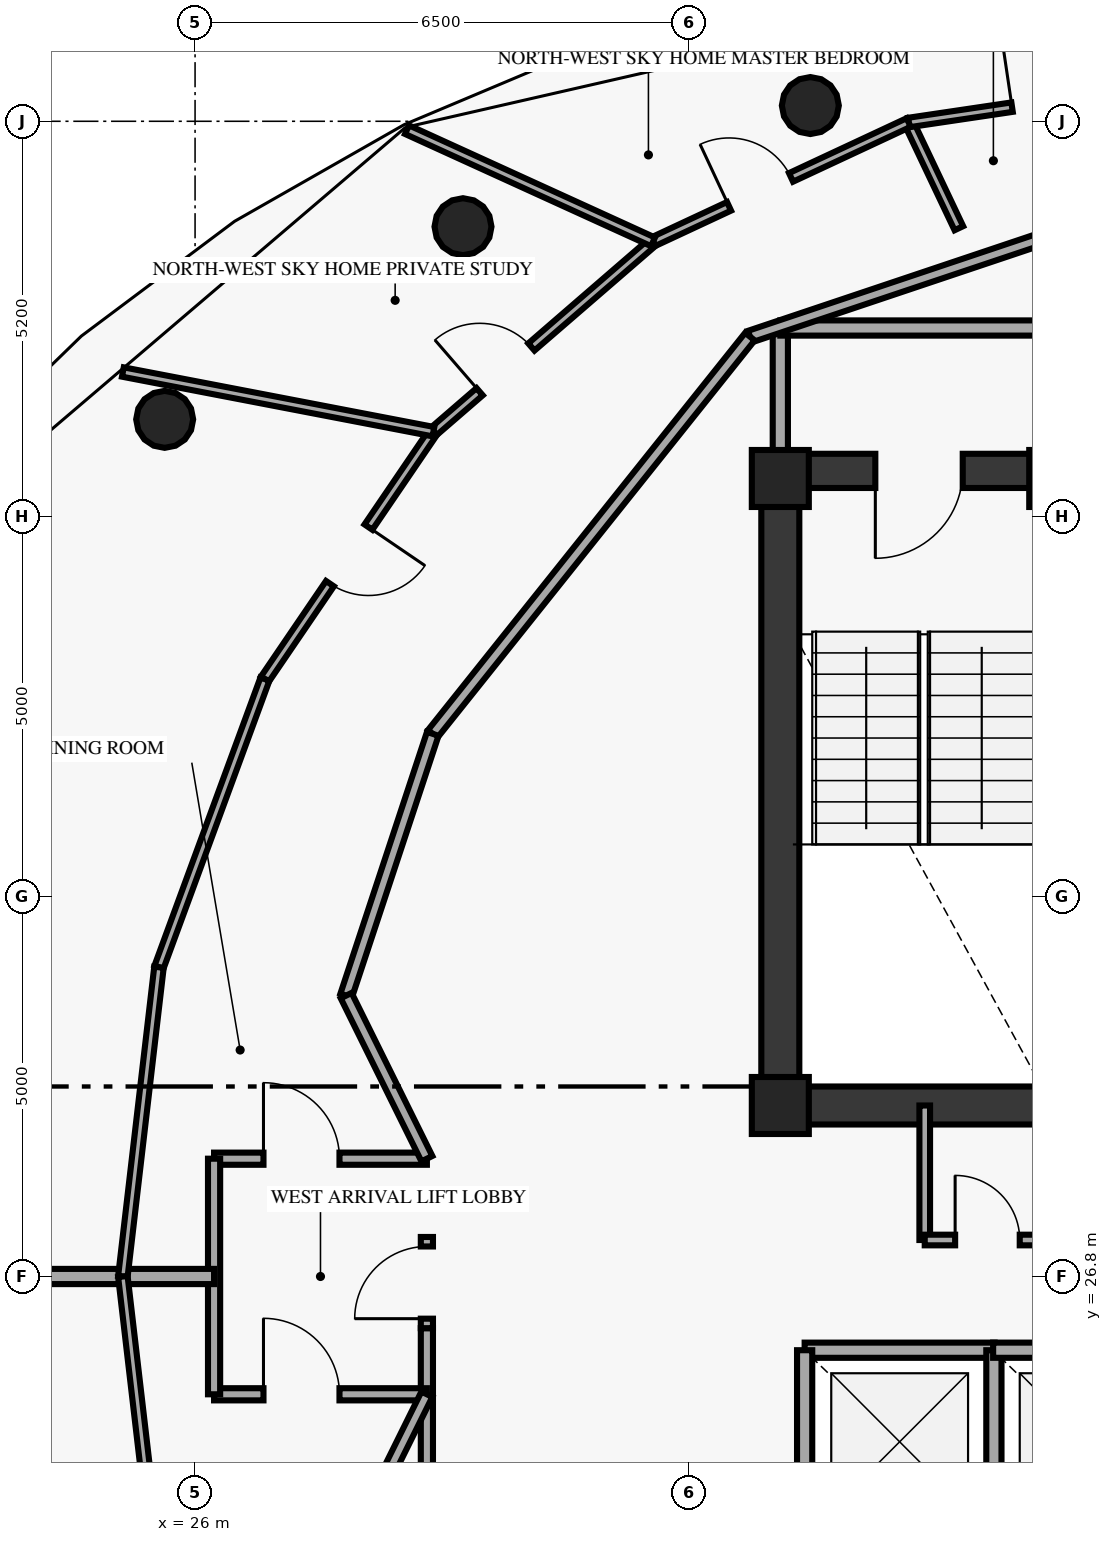
"""IFC4 building model, lengths in metres.
Left out: names, types, materials, properties, quantities, classifications, styles, units other than length and angle.
Written with IfcOpenShell. Run it as: python <this file> out.ifc"""

import sys

from ifc_helpers import new_model, si_unit, direction, frame, frame_2d, origin, origin_2d, place, context, subcontext, project, spatial, rectangle, circle, extrude, element, fill, save


model = new_model("IFC4")
c1 = context("Model", 3, precision=1e-05, world=origin(), true_north=direction((0.0, 1.0)))
c2 = subcontext(c1, "Body", "Model", "MODEL_VIEW")
j1 = project(units=[si_unit("LENGTHUNIT", "METRE"), si_unit("PLANEANGLEUNIT", "RADIAN")], contexts=[c1])
p1 = place(None, origin())
s1 = spatial("IfcSite", under=j1, at=p1, CompositionType="ELEMENT")
p2 = place(p1, origin())
s2 = spatial("IfcBuilding", under=s1, at=p2, CompositionType="ELEMENT")
p3 = place(p2, frame((0.0, 0.0, 297.4)))
s3 = spatial("IfcBuildingStorey", under=s2, at=p3, CompositionType="ELEMENT", Elevation=297.4)
for number, where, z_axis, x_axis in (
    (1, (37.35, 37.3, 0.0), (0.0, 0.0, 1.0), (1.0, 0.0, 0.0)),
    (2, (33.7, 37.3, 0.0), (0.0, 0.0, 1.0), (1.0, 0.0, 0.0)),
    (3, (33.7, 29.05, 0.0), (0.0, 0.0, 1.0), (1.0, 0.0, 0.0)),
):
    element("IfcColumn", number, at=place(p3, frame(where, z_axis=z_axis, x_axis=x_axis)), inside=s3, PredefinedType="PILASTER", context=c2, shape_type="SweptSolid", body=[
        extrude(rectangle(XDim=0.75, YDim=0.75, at=origin_2d()), origin(), (0.0, 0.0, 1.0), 3.45),
    ])
for number, where, z_axis, x_axis in (
    (4, (34.095, 42.207, 0.0), (0.0, 0.0, 1.0), (1.0, 0.0, 0.0)),
    (5, (29.525, 40.613, 0.0), (0.0, 0.0, 1.0), (1.0, 0.0, 0.0)),
    (6, (25.6, 38.078, 0.0), (0.0, 0.0, 1.0), (1.0, 0.0, 0.0)),
):
    element("IfcColumn", number, at=place(p3, frame(where, z_axis=z_axis, x_axis=x_axis)), inside=s3, PredefinedType="COLUMN", context=c2, shape_type="SweptSolid", body=[
        extrude(circle(Radius=0.375, at=origin_2d()), origin(), (0.0, 0.0, 1.0), 3.45),
    ])
p4 = place(p3, frame((33.7, 29.05, 0.0), z_axis=(0.0, 0.0, 1.0), x_axis=(0.0, 1.0, 0.0)))
e7 = element("IfcWall", 7, at=p4, inside=s3, PredefinedType="SHEAR", context=c2, shape_type="SweptSolid", body=[
    extrude(rectangle(XDim=8.35, YDim=0.5, at=frame_2d((4.175, 0.0))), origin(), (0.0, 0.0, 1.0), 3.45),
])
p5 = place(p3, frame((33.7, 29.05, 0.0), z_axis=(0.0, 0.0, 1.0), x_axis=(1.0, 0.0, 0.0)))
e8 = element("IfcWall", 8, at=p5, inside=s3, PredefinedType="SHEAR", context=c2, shape_type="SweptSolid", body=[
    extrude(rectangle(XDim=10.6, YDim=0.5, at=frame_2d((5.3, 0.0))), origin(), (0.0, 0.0, 1.0), 3.45),
])
p6 = place(p3, frame((37.35, 37.4, 0.0), z_axis=(0.0, 0.0, 1.0), x_axis=(-1.0, 0.0, 0.0)))
e9 = element("IfcWall", 9, at=p6, inside=s3, PredefinedType="SHEAR", context=c2, shape_type="SweptSolid", body=[
    extrude(rectangle(XDim=3.65, YDim=0.45, at=frame_2d((1.825, 0.0))), origin(), (0.0, 0.0, 1.0), 3.45),
])
p7 = place(p6, frame((1.25, 0.0, 0.0)))
e10 = element("IfcOpeningElement", 10, at=p7, cuts=e9, PredefinedType="OPENING", context=c2, shape_type="SweptSolid", body=[
    extrude(rectangle(XDim=1.15, YDim=2.15, at=frame_2d((0.575, 1.075))), frame((0.0, 0.235, 0.0), z_axis=(0.0, -1.0, 0.0), x_axis=(1.0, 0.0, 0.0)), (0.0, 0.0, 1.0), 0.47),
])
p8 = place(p3, frame((33.7, 37.4, 0.0), z_axis=(0.0, 0.0, 1.0), x_axis=(0.0, 1.0, 0.0)))
e11 = element("IfcWall", 11, at=p8, inside=s3, PredefinedType="SOLIDWALL", context=c2, shape_type="SweptSolid", body=[
    extrude(rectangle(XDim=1.88, YDim=0.2, at=frame_2d((0.94, 0.0))), origin(), (0.0, 0.0, 1.0), 3.45),
])
p9 = place(p3, frame((38.9, 39.28, 0.0), z_axis=(0.0, 0.0, 1.0), x_axis=(-1.0, 0.0, 0.0)))
e12 = element("IfcWall", 12, at=p9, inside=s3, PredefinedType="SOLIDWALL", context=c2, shape_type="SweptSolid", body=[
    extrude(rectangle(XDim=5.2, YDim=0.2, at=frame_2d((2.6, 0.0))), origin(), (0.0, 0.0, 1.0), 3.45),
])
p10 = place(p9, frame((0.2, 0.0, 0.0)))
e13 = element("IfcOpeningElement", 13, at=p10, cuts=e12, PredefinedType="OPENING", context=c2, shape_type="SweptSolid", body=[
    extrude(rectangle(XDim=1.6, YDim=2.2, at=frame_2d((0.8, 1.1))), frame((0.0, 0.11, 0.0), z_axis=(0.0, -1.0, 0.0), x_axis=(1.0, 0.0, 0.0)), (0.0, 0.0, 1.0), 0.22),
])
p11 = place(p3, frame((35.6, 27.28, 0.0), z_axis=(0.0, 0.0, 1.0), x_axis=(0.0, 1.0, 0.0)))
e14 = element("IfcWall", 14, at=p11, inside=s3, PredefinedType="PARTITIONING", context=c2, shape_type="SweptSolid", body=[
    extrude(rectangle(XDim=1.77, YDim=0.14, at=frame_2d((0.885, 0.0))), origin(), (0.0, 0.0, 1.0), 3.45),
])
p12 = place(p3, frame((34.02, 25.83, 0.0), z_axis=(0.0, 0.0, 1.0), x_axis=(1.0, 0.0, 0.0)))
e15 = element("IfcWall", 15, at=p12, inside=s3, PredefinedType="SOLIDWALL", context=c2, shape_type="SweptSolid", body=[
    extrude(rectangle(XDim=2.5, YDim=0.2, at=frame_2d((1.25, 0.0))), origin(), (0.0, 0.0, 1.0), 3.45),
])
for number, where, z_axis, x_axis in (
    (16, (34.02, 23.42, 0.0), (0.0, 0.0, 1.0), (0.0, 1.0, 0.0)),
    (17, (36.51, 23.42, 0.0), (0.0, 0.0, 1.0), (0.0, 1.0, 0.0)),
):
    element("IfcWall", number, at=place(p3, frame(where, z_axis=z_axis, x_axis=x_axis)), inside=s3, PredefinedType="SOLIDWALL", context=c2, shape_type="SweptSolid", body=[
        extrude(rectangle(XDim=2.41, YDim=0.2, at=frame_2d((1.205, 0.0))), origin(), (0.0, 0.0, 1.0), 3.45),
    ])
p13 = place(p3, frame((36.5, 25.83, 0.0), z_axis=(0.0, 0.0, 1.0), x_axis=(1.0, 0.0, 0.0)))
e18 = element("IfcWall", 18, at=p13, inside=s3, PredefinedType="SOLIDWALL", context=c2, shape_type="SweptSolid", body=[
    extrude(rectangle(XDim=2.5, YDim=0.2, at=frame_2d((1.25, 0.0))), origin(), (0.0, 0.0, 1.0), 3.45),
])
p14 = place(p3, frame((29.05, 19.05, 0.0), z_axis=(0.0, 0.0, 1.0), x_axis=(0.0, 1.0, 0.0)))
e19 = element("IfcWall", 19, at=p14, inside=s3, PredefinedType="PARTITIONING", context=c2, shape_type="SweptSolid", body=[
    extrude(rectangle(XDim=7.07, YDim=0.16, at=frame_2d((3.535, 0.0))), origin(), (0.0, 0.0, 1.0), 3.45),
])
p15 = place(p3, frame((29.05, 26.12, 0.0), z_axis=(0.0, 0.0, 1.0), x_axis=(0.0, 1.0, 0.0)))
e20 = element("IfcWall", 20, at=p15, inside=s3, PredefinedType="PARTITIONING", context=c2, shape_type="SweptSolid", body=[
    extrude(rectangle(XDim=1.2, YDim=0.16, at=frame_2d((0.6, 0.0))), origin(), (0.0, 0.0, 1.0), 3.45),
])
p16 = place(p15, frame((0.125, 0.0, 0.0)))
e21 = element("IfcOpeningElement", 21, at=p16, cuts=e20, PredefinedType="OPENING", context=c2, shape_type="SweptSolid", body=[
    extrude(rectangle(XDim=0.95, YDim=2.15, at=frame_2d((0.475, 1.075))), frame((0.0, 0.09, 0.0), z_axis=(0.0, -1.0, 0.0), x_axis=(1.0, 0.0, 0.0)), (0.0, 0.0, 1.0), 0.18),
])
p17 = place(p3, frame((35.6, 27.28, 0.0), z_axis=(0.0, 0.0, 1.0), x_axis=(1.0, 0.0, 0.0)))
e22 = element("IfcWall", 22, at=p17, inside=s3, PredefinedType="PARTITIONING", context=c2, shape_type="SweptSolid", body=[
    extrude(rectangle(XDim=5.4, YDim=0.14, at=frame_2d((2.7, 0.0))), origin(), (0.0, 0.0, 1.0), 3.45),
])
p18 = place(p17, frame((0.4, 0.0, 0.0)))
e23 = element("IfcOpeningElement", 23, at=p18, cuts=e22, PredefinedType="OPENING", context=c2, shape_type="SweptSolid", body=[
    extrude(rectangle(XDim=0.85, YDim=2.1, at=frame_2d((0.425, 1.05))), frame((0.0, 0.08, 0.0), z_axis=(0.0, -1.0, 0.0), x_axis=(1.0, 0.0, 0.0)), (0.0, 0.0, 1.0), 0.16),
])
p19 = place(p17, frame((2.25, 0.0, 0.0)))
e24 = element("IfcOpeningElement", 24, at=p19, cuts=e22, PredefinedType="OPENING", context=c2, shape_type="SweptSolid", body=[
    extrude(rectangle(XDim=0.95, YDim=2.1, at=frame_2d((0.475, 1.05))), frame((0.0, 0.08, 0.0), z_axis=(0.0, -1.0, 0.0), x_axis=(1.0, 0.0, 0.0)), (0.0, 0.0, 1.0), 0.16),
])
p20 = place(p17, frame((4.2, 0.0, 0.0)))
e25 = element("IfcOpeningElement", 25, at=p20, cuts=e22, PredefinedType="OPENING", context=c2, shape_type="SweptSolid", body=[
    extrude(rectangle(XDim=0.8, YDim=2.05, at=frame_2d((0.4, 1.025))), frame((0.0, 0.08, 0.0), z_axis=(0.0, -1.0, 0.0), x_axis=(1.0, 0.0, 0.0)), (0.0, 0.0, 1.0), 0.16),
])
p21 = place(p3, frame((39.0, 41.08, 0.0), z_axis=(0.0, 0.0, 1.0), x_axis=(-0.948027514656, -0.318188358455, 0.0)))
e26 = element("IfcWall", 26, at=p21, inside=s3, PredefinedType="PARTITIONING", context=c2, shape_type="SweptSolid", body=[
    extrude(rectangle(XDim=6.012, YDim=0.16, at=frame_2d((3.006, 0.0))), origin(), (0.0, 0.0, 1.0), 3.45),
])
p22 = place(p3, frame((33.3, 39.167, 0.0), z_axis=(0.0, 0.0, 1.0), x_axis=(-0.623915746766, -0.781491612839, 0.0)))
e27 = element("IfcWall", 27, at=p22, inside=s3, PredefinedType="PARTITIONING", context=c2, shape_type="SweptSolid", body=[
    extrude(rectangle(XDim=6.688, YDim=0.16, at=frame_2d((3.344, 0.0))), origin(), (0.0, 0.0, 1.0), 3.45),
])
p23 = place(p3, frame((29.127, 33.94, 0.0), z_axis=(0.0, 0.0, 1.0), x_axis=(-0.313985571683, -0.949427754374, 0.0)))
e28 = element("IfcWall", 28, at=p23, inside=s3, PredefinedType="PARTITIONING", context=c2, shape_type="SweptSolid", body=[
    extrude(rectangle(XDim=3.627, YDim=0.16, at=frame_2d((1.813, 0.0))), origin(), (0.0, 0.0, 1.0), 3.45),
])
p24 = place(p3, frame((26.25, 28.35, 0.0), z_axis=(0.0, 0.0, 1.0), x_axis=(1.0, 0.0, 0.0)))
e29 = element("IfcWall", 29, at=p24, inside=s3, PredefinedType="PARTITIONING", context=c2, shape_type="SweptSolid", body=[
    extrude(rectangle(XDim=2.8, YDim=0.16, at=frame_2d((1.4, 0.0))), origin(), (0.0, 0.0, 1.0), 2.515),
])
p25 = place(p24, frame((0.65, 0.0, 0.0)))
e30 = element("IfcOpeningElement", 30, at=p25, cuts=e29, PredefinedType="OPENING", context=c2, shape_type="SweptSolid", body=[
    extrude(rectangle(XDim=1.0, YDim=2.15, at=frame_2d((0.5, 1.075))), frame((0.0, 0.09, 0.0), z_axis=(0.0, -1.0, 0.0), x_axis=(1.0, 0.0, 0.0)), (0.0, 0.0, 1.0), 0.18),
])
p26 = place(p3, frame((26.25, 25.25, 0.0), z_axis=(0.0, 0.0, 1.0), x_axis=(1.0, 0.0, 0.0)))
e31 = element("IfcWall", 31, at=p26, inside=s3, PredefinedType="PARTITIONING", context=c2, shape_type="SweptSolid", body=[
    extrude(rectangle(XDim=2.8, YDim=0.16, at=frame_2d((1.4, 0.0))), origin(), (0.0, 0.0, 1.0), 3.45),
])
p27 = place(p26, frame((0.65, 0.0, 0.0)))
e32 = element("IfcOpeningElement", 32, at=p27, cuts=e31, PredefinedType="OPENING", context=c2, shape_type="SweptSolid", body=[
    extrude(rectangle(XDim=1.0, YDim=2.15, at=frame_2d((0.5, 1.075))), frame((0.0, 0.09, 0.0), z_axis=(0.0, -1.0, 0.0), x_axis=(1.0, 0.0, 0.0)), (0.0, 0.0, 1.0), 0.18),
])
p28 = place(p3, frame((26.25, 25.25, 0.0), z_axis=(0.0, 0.0, 1.0), x_axis=(0.0, 1.0, 0.0)))
e33 = element("IfcWall", 33, at=p28, inside=s3, PredefinedType="PARTITIONING", context=c2, shape_type="SweptSolid", body=[
    extrude(rectangle(XDim=3.1, YDim=0.16, at=frame_2d((1.55, 0.0))), origin(), (0.0, 0.0, 1.0), 3.45),
])
for number, where, z_axis, x_axis in (
    (34, (27.988, 30.496, 0.0), (0.0, 0.0, 1.0), (0.444, -0.896, 0.0)),
    (35, (27.988, 23.104, 0.0), (0.0, 0.0, 1.0), (0.444, 0.896, 0.0)),
):
    element("IfcWall", number, at=place(p3, frame(where, z_axis=z_axis, x_axis=x_axis)), inside=s3, PredefinedType="PARTITIONING", context=c2, shape_type="SweptSolid", body=[
        extrude(rectangle(XDim=2.394, YDim=0.16, at=frame_2d((1.197, 0.0))), origin(), (0.0, 0.0, 1.0), 3.45),
    ])
p29 = place(p3, frame((26.25, 26.8, 0.0), z_axis=(0.0, 0.0, 1.0), x_axis=(-1.0, 0.0, 0.0)))
e36 = element("IfcWall", 36, at=p29, inside=s3, PredefinedType="PARTITIONING", context=c2, shape_type="SweptSolid", body=[
    extrude(rectangle(XDim=1.2, YDim=0.2, at=frame_2d((0.6, 0.0))), origin(), (0.0, 0.0, 1.0), 3.45),
])
p30 = place(p3, frame((25.05, 26.8, 0.0), z_axis=(0.0, 0.0, 1.0), x_axis=(-1.0, 0.0, 0.0)))
e37 = element("IfcWall", 37, at=p30, inside=s3, PredefinedType="PARTITIONING", context=c2, shape_type="SweptSolid", body=[
    extrude(rectangle(XDim=3.102, YDim=0.2, at=frame_2d((1.551, 0.0))), origin(), (0.0, 0.0, 1.0), 3.45),
])
p31 = place(p3, frame((36.049, 40.593, 0.0), z_axis=(0.0, 0.0, 1.0), x_axis=(-0.428788325004, 0.903404987998, 0.0)))
e38 = element("IfcWall", 38, at=p31, inside=s3, PredefinedType="PARTITIONING", context=c2, shape_type="SweptSolid", body=[
    extrude(rectangle(XDim=1.54, YDim=0.125, at=frame_2d((0.77, 0.0))), origin(), (0.0, 0.0, 1.0), 3.45),
])
p32 = place(p3, frame((35.389, 41.984, 0.0), z_axis=(0.0, 0.0, 1.0), x_axis=(0.989157453542, 0.146858884996, 0.0)))
e39 = element("IfcWall", 39, at=p32, inside=s3, PredefinedType="PARTITIONING", context=c2, shape_type="SweptSolid", body=[
    extrude(rectangle(XDim=3.651, YDim=0.125, at=frame_2d((1.825, 0.0))), origin(), (0.0, 0.0, 1.0), 3.45),
])
p33 = place(p32, frame((1.375, 0.0, 0.0)))
e40 = element("IfcOpeningElement", 40, at=p33, cuts=e39, PredefinedType="OPENING", context=c2, shape_type="SweptSolid", body=[
    extrude(rectangle(XDim=0.9, YDim=2.1, at=frame_2d((0.45, 1.05))), frame((0.0, 0.073, 0.0), z_axis=(0.0, -1.0, 0.0), x_axis=(1.0, 0.0, 0.0)), (0.0, 0.0, 1.0), 0.145),
])
p34 = place(p3, frame((32.025, 40.414, 0.0), z_axis=(0.0, 0.0, 1.0), x_axis=(0.906188180382, 0.422874664334, 0.0)))
e41 = element("IfcWall", 41, at=p34, inside=s3, PredefinedType="PARTITIONING", context=c2, shape_type="SweptSolid", body=[
    extrude(rectangle(XDim=3.712, YDim=0.125, at=frame_2d((1.856, 0.0))), origin(), (0.0, 0.0, 1.0), 3.45),
])
p35 = place(p34, frame((1.104, 0.0, 0.0)))
e42 = element("IfcOpeningElement", 42, at=p35, cuts=e41, PredefinedType="OPENING", context=c2, shape_type="SweptSolid", body=[
    extrude(rectangle(XDim=0.9, YDim=2.1, at=frame_2d((0.45, 1.05))), frame((0.0, 0.073, 0.0), z_axis=(0.0, -1.0, 0.0), x_axis=(1.0, 0.0, 0.0)), (0.0, 0.0, 1.0), 0.145),
])
p36 = place(p3, frame((29.136, 37.916, 0.0), z_axis=(0.0, 0.0, 1.0), x_axis=(0.756424716633, 0.654080765706, 0.0)))
e43 = element("IfcWall", 43, at=p36, inside=s3, PredefinedType="PARTITIONING", context=c2, shape_type="SweptSolid", body=[
    extrude(rectangle(XDim=3.819, YDim=0.125, at=frame_2d((1.91, 0.0))), origin(), (0.0, 0.0, 1.0), 3.45),
])
p37 = place(p36, frame((0.804, 0.0, 0.0)))
e44 = element("IfcOpeningElement", 44, at=p37, cuts=e43, PredefinedType="OPENING", context=c2, shape_type="SweptSolid", body=[
    extrude(rectangle(XDim=0.9, YDim=2.1, at=frame_2d((0.45, 1.05))), frame((0.0, 0.073, 0.0), z_axis=(0.0, -1.0, 0.0), x_axis=(1.0, 0.0, 0.0)), (0.0, 0.0, 1.0), 0.145),
])
p38 = place(p3, frame((26.919, 34.66, 0.0), z_axis=(0.0, 0.0, 1.0), x_axis=(0.562811699753, 0.826585138157, 0.0)))
e45 = element("IfcWall", 45, at=p38, inside=s3, PredefinedType="PARTITIONING", context=c2, shape_type="SweptSolid", body=[
    extrude(rectangle(XDim=3.939, YDim=0.125, at=frame_2d((1.97, 0.0))), origin(), (0.0, 0.0, 1.0), 3.45),
])
p39 = place(p38, frame((1.52, 0.0, 0.0)))
e46 = element("IfcOpeningElement", 46, at=p39, cuts=e45, PredefinedType="OPENING", context=c2, shape_type="SweptSolid", body=[
    extrude(rectangle(XDim=0.9, YDim=2.1, at=frame_2d((0.45, 1.05))), frame((0.0, 0.073, 0.0), z_axis=(0.0, -1.0, 0.0), x_axis=(1.0, 0.0, 0.0)), (0.0, 0.0, 1.0), 0.145),
])
p40 = place(p3, frame((26.919, 34.66, 0.0), z_axis=(0.0, 0.0, 1.0), x_axis=(-0.345128286029, -0.938555521097, 0.0)))
e47 = element("IfcWall", 47, at=p40, inside=s3, PredefinedType="PARTITIONING", context=c2, shape_type="SweptSolid", body=[
    extrude(rectangle(XDim=4.039, YDim=0.125, at=frame_2d((2.02, 0.0))), origin(), (0.0, 0.0, 1.0), 3.45),
])
p41 = place(p3, frame((25.525, 30.869, 0.0), z_axis=(0.0, 0.0, 1.0), x_axis=(-0.115917937966, -0.993258793899, 0.0)))
e48 = element("IfcWall", 48, at=p41, inside=s3, PredefinedType="PARTITIONING", context=c2, shape_type="SweptSolid", body=[
    extrude(rectangle(XDim=4.096, YDim=0.125, at=frame_2d((2.048, 0.0))), origin(), (0.0, 0.0, 1.0), 3.45),
])
p42 = place(p3, frame((32.025, 40.414, 0.0), z_axis=(0.0, 0.0, 1.0), x_axis=(-0.90988404677, 0.414862653698, 0.0)))
e49 = element("IfcWall", 49, at=p42, inside=s3, PredefinedType="PARTITIONING", context=c2, shape_type="SweptSolid", body=[
    extrude(rectangle(XDim=3.557, YDim=0.125, at=frame_2d((1.779, 0.0))), origin(), (0.0, 0.0, 1.0), 3.45),
])
p43 = place(p3, frame((29.136, 37.916, 0.0), z_axis=(0.0, 0.0, 1.0), x_axis=(-0.982044095555, 0.188651515727, 0.0)))
e50 = element("IfcWall", 50, at=p43, inside=s3, PredefinedType="PARTITIONING", context=c2, shape_type="SweptSolid", body=[
    extrude(rectangle(XDim=4.161, YDim=0.125, at=frame_2d((2.08, 0.0))), origin(), (0.0, 0.0, 1.0), 3.45),
])
p44 = place(p3, frame((25.05, 26.8, 0.0), z_axis=(0.0, 0.0, 1.0), x_axis=(0.115911076473, -0.993259594643, 0.0)))
e51 = element("IfcWall", 51, at=p44, inside=s3, PredefinedType="PARTITIONING", context=c2, shape_type="SweptSolid", body=[
    extrude(rectangle(XDim=4.097, YDim=0.125, at=frame_2d((2.048, 0.0))), origin(), (0.0, 0.0, 1.0), 3.45),
])
p45 = place(p7, origin())
e52 = element("IfcDoor", 52, at=p45, inside=s3, OperationType="SINGLE_SWING_RIGHT", PredefinedType="DOOR", context=c2, shape_type="SweptSolid", body=[
    extrude(rectangle(XDim=1.15, YDim=2.15, at=frame_2d((0.575, 1.075))), frame((0.0, 0.025, 0.0), z_axis=(0.0, -1.0, 0.0), x_axis=(1.0, 0.0, 0.0)), (0.0, 0.0, 1.0), 0.05),
])
fill(e10, e52)
p46 = place(p16, origin())
e53 = element("IfcDoor", 53, at=p46, inside=s3, OperationType="SINGLE_SWING_RIGHT", PredefinedType="DOOR", context=c2, shape_type="SweptSolid", body=[
    extrude(rectangle(XDim=0.95, YDim=2.15, at=frame_2d((0.475, 1.075))), frame((0.0, 0.025, 0.0), z_axis=(0.0, -1.0, 0.0), x_axis=(1.0, 0.0, 0.0)), (0.0, 0.0, 1.0), 0.05),
])
fill(e21, e53)
p47 = place(p18, origin())
e54 = element("IfcDoor", 54, at=p47, inside=s3, OperationType="SINGLE_SWING_LEFT", PredefinedType="DOOR", context=c2, shape_type="SweptSolid", body=[
    extrude(rectangle(XDim=0.85, YDim=2.1, at=frame_2d((0.425, 1.05))), frame((0.0, 0.025, 0.0), z_axis=(0.0, -1.0, 0.0), x_axis=(1.0, 0.0, 0.0)), (0.0, 0.0, 1.0), 0.05),
])
fill(e23, e54)
p48 = place(p25, origin())
e55 = element("IfcDoor", 55, at=p48, inside=s3, OperationType="SINGLE_SWING_LEFT", PredefinedType="DOOR", context=c2, shape_type="SweptSolid", body=[
    extrude(rectangle(XDim=1.0, YDim=2.15, at=frame_2d((0.5, 1.075))), frame((0.0, 0.025, 0.0), z_axis=(0.0, -1.0, 0.0), x_axis=(1.0, 0.0, 0.0)), (0.0, 0.0, 1.0), 0.05),
])
fill(e30, e55)
p49 = place(p27, origin())
e56 = element("IfcDoor", 56, at=p49, inside=s3, OperationType="SINGLE_SWING_LEFT", PredefinedType="DOOR", context=c2, shape_type="SweptSolid", body=[
    extrude(rectangle(XDim=1.0, YDim=2.15, at=frame_2d((0.5, 1.075))), frame((0.0, 0.025, 0.0), z_axis=(0.0, -1.0, 0.0), x_axis=(1.0, 0.0, 0.0)), (0.0, 0.0, 1.0), 0.05),
])
fill(e32, e56)
p50 = place(p33, origin())
e57 = element("IfcDoor", 57, at=p50, inside=s3, OperationType="SINGLE_SWING_LEFT", PredefinedType="DOOR", context=c2, shape_type="SweptSolid", body=[
    extrude(rectangle(XDim=0.9, YDim=2.1, at=frame_2d((0.45, 1.05))), frame((0.0, 0.025, 0.0), z_axis=(0.0, -1.0, 0.0), x_axis=(1.0, 0.0, 0.0)), (0.0, 0.0, 1.0), 0.05),
])
fill(e40, e57)
p51 = place(p35, origin())
e58 = element("IfcDoor", 58, at=p51, inside=s3, OperationType="SINGLE_SWING_LEFT", PredefinedType="DOOR", context=c2, shape_type="SweptSolid", body=[
    extrude(rectangle(XDim=0.9, YDim=2.1, at=frame_2d((0.45, 1.05))), frame((0.0, 0.025, 0.0), z_axis=(0.0, -1.0, 0.0), x_axis=(1.0, 0.0, 0.0)), (0.0, 0.0, 1.0), 0.05),
])
fill(e42, e58)
p52 = place(p37, origin())
e59 = element("IfcDoor", 59, at=p52, inside=s3, OperationType="SINGLE_SWING_LEFT", PredefinedType="DOOR", context=c2, shape_type="SweptSolid", body=[
    extrude(rectangle(XDim=0.9, YDim=2.1, at=frame_2d((0.45, 1.05))), frame((0.0, 0.025, 0.0), z_axis=(0.0, -1.0, 0.0), x_axis=(1.0, 0.0, 0.0)), (0.0, 0.0, 1.0), 0.05),
])
fill(e44, e59)
p53 = place(p39, origin())
e60 = element("IfcDoor", 60, at=p53, inside=s3, OperationType="SINGLE_SWING_RIGHT", PredefinedType="DOOR", context=c2, shape_type="SweptSolid", body=[
    extrude(rectangle(XDim=0.9, YDim=2.1, at=frame_2d((0.45, 1.05))), frame((0.0, 0.025, 0.0), z_axis=(0.0, -1.0, 0.0), x_axis=(1.0, 0.0, 0.0)), (0.0, 0.0, 1.0), 0.05),
])
fill(e46, e60)
save(model, sys.argv[1])
